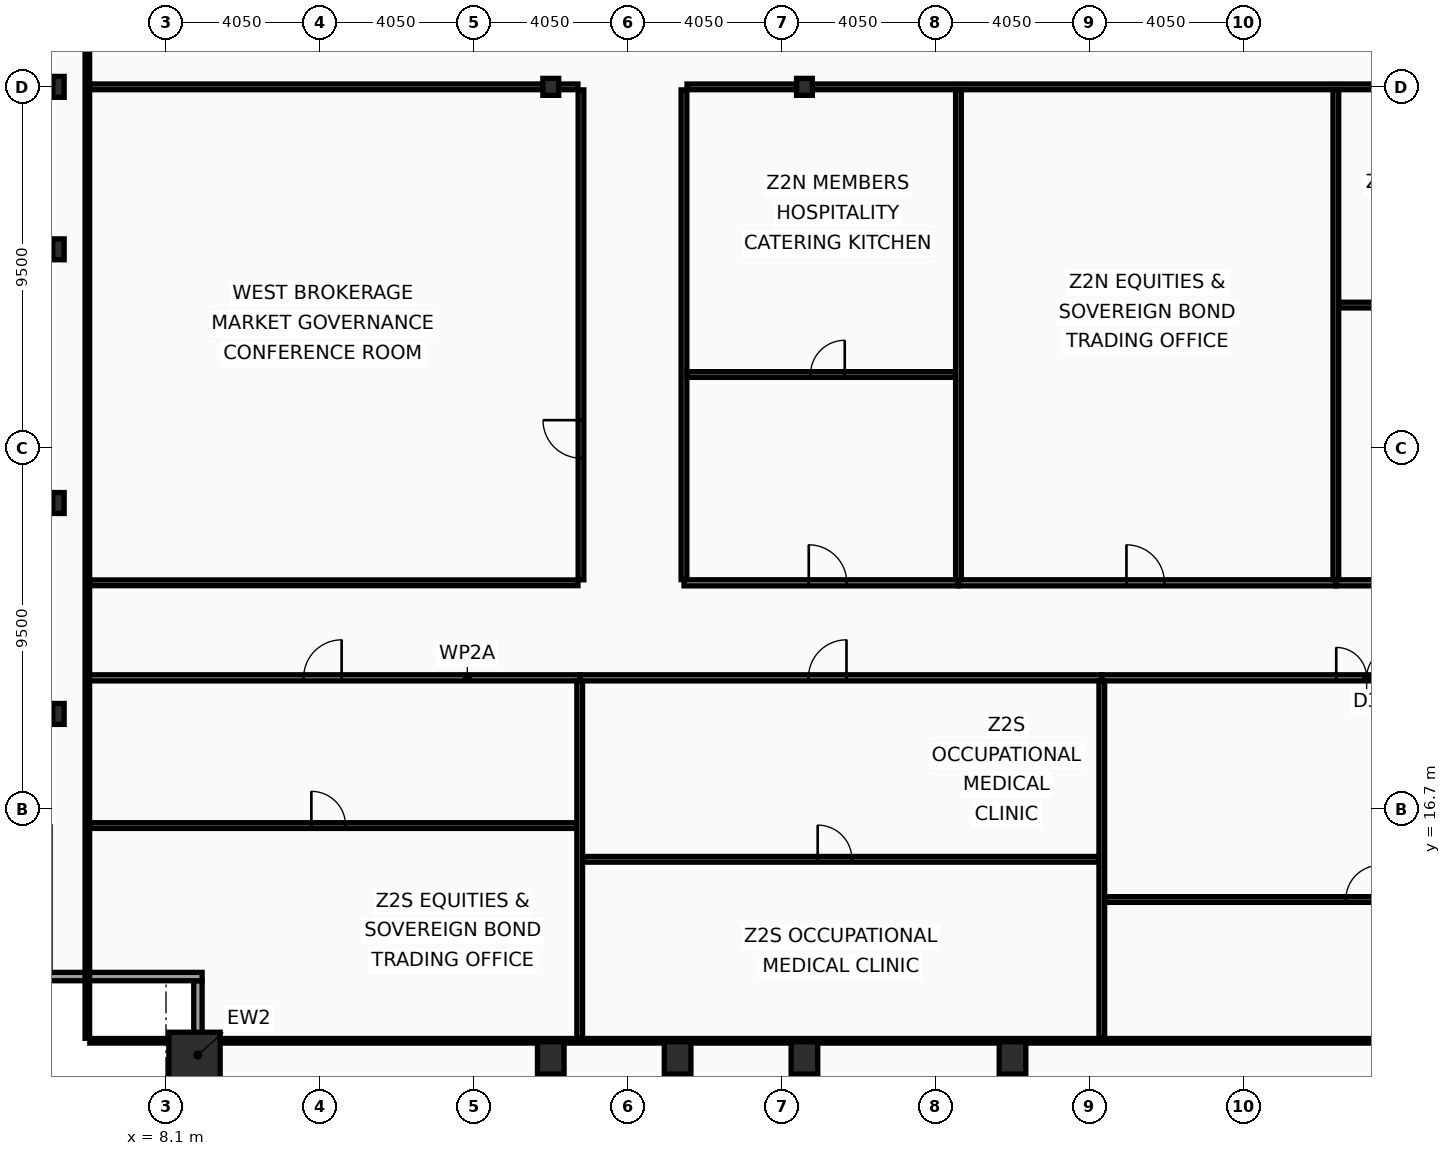
"""IFC4 building model, lengths in metres.
Left out: names, types, materials, properties, quantities, classifications, styles, units other than length and angle.
Written with IfcOpenShell. Run it as: python <this file> out.ifc"""

import sys

from ifc_helpers import new_model, si_unit, direction, frame, frame_2d, origin, origin_2d, place, context, subcontext, project, spatial, rectangle, hollow_rectangle, i_section, extrude, element, fill, save


model = new_model("IFC4")
c1 = context("Model", 3, precision=1e-05, world=origin(), true_north=direction((0.0, 1.0)))
c2 = subcontext(c1, "Body", "Model", "MODEL_VIEW")
j1 = project(units=[si_unit("LENGTHUNIT", "METRE"), si_unit("PLANEANGLEUNIT", "RADIAN")], contexts=[c1])
p1 = place(None, origin())
s1 = spatial("IfcSite", under=j1, at=p1, CompositionType="ELEMENT")
p2 = place(p1, origin())
s2 = spatial("IfcBuilding", under=s1, at=p2, CompositionType="ELEMENT")
p3 = place(p2, frame((0.0, 0.0, 157.8)))
s3 = spatial("IfcBuildingStorey", under=s2, at=p3, CompositionType="ELEMENT", Elevation=157.8)
p4 = place(p3, frame((8.85, 10.15, 0.0), z_axis=(0.0, 0.0, 1.0), x_axis=(1.0, 0.0, 0.0)))
e1 = element("IfcColumn", 1, at=p4, inside=s3, PredefinedType="COLUMN", context=c2, shape_type="SweptSolid", body=[
    extrude(hollow_rectangle(XDim=1.35, YDim=1.35, WallThickness=0.065, at=origin_2d()), origin(), (0.0, 0.0, 1.0), 3.6),
])
for number, where, z_axis, x_axis in (
    (2, (18.225, 10.15, 0.0), (0.0, 0.0, 1.0), (1.0, 0.0, 0.0)),
    (3, (21.562, 10.15, 0.0), (0.0, 0.0, 1.0), (1.0, 0.0, 0.0)),
    (4, (24.9, 10.15, 0.0), (0.0, 0.0, 1.0), (1.0, 0.0, 0.0)),
    (5, (30.375, 10.15, 0.0), (0.0, 0.0, 1.0), (1.0, 0.0, 0.0)),
):
    element("IfcColumn", number, at=place(p3, frame(where, z_axis=z_axis, x_axis=x_axis)), inside=s3, PredefinedType="COLUMN", context=c2, shape_type="SweptSolid", body=[
        extrude(hollow_rectangle(XDim=0.7, YDim=0.85, WallThickness=0.05, at=origin_2d()), origin(), (0.0, 0.0, 1.0), 3.6),
    ])
for number, where, z_axis, x_axis in (
    (6, (5.27, 19.2, 0.0), (0.0, 0.0, 1.0), (1.0, 0.0, 0.0)),
    (7, (5.27, 24.75, 0.0), (0.0, 0.0, 1.0), (1.0, 0.0, 0.0)),
    (8, (5.27, 31.425, 0.0), (0.0, 0.0, 1.0), (1.0, 0.0, 0.0)),
    (9, (5.27, 35.7, 0.0), (0.0, 0.0, 1.0), (1.0, 0.0, 0.0)),
):
    element("IfcColumn", number, at=place(p3, frame(where, z_axis=z_axis, x_axis=x_axis)), inside=s3, PredefinedType="COLUMN", context=c2, shape_type="SweptSolid", body=[
        extrude(i_section(OverallWidth=0.3, OverallDepth=0.55, WebThickness=0.015, FlangeThickness=0.029, at=origin_2d()), origin(), (0.0, 0.0, 1.0), 3.6),
    ])
for number, where, z_axis, x_axis in (
    (10, (18.225, 35.7, 0.0), (0.0, 0.0, 1.0), (1.0, 0.0, 0.0)),
    (11, (24.9, 35.7, 0.0), (0.0, 0.0, 1.0), (1.0, 0.0, 0.0)),
):
    element("IfcColumn", number, at=place(p3, frame(where, z_axis=z_axis, x_axis=x_axis)), inside=s3, PredefinedType="COLUMN", context=c2, shape_type="SweptSolid", body=[
        extrude(i_section(OverallWidth=0.416, OverallDepth=0.446, WebThickness=0.039, FlangeThickness=0.063, at=origin_2d()), origin(), (0.0, 0.0, 1.0), 3.6),
    ])
p5 = place(p3, frame((8.94, 8.27, 0.0), z_axis=(0.0, 0.0, 1.0), x_axis=(0.0, 1.0, 0.0)))
e12 = element("IfcWall", 12, at=p5, inside=s3, PredefinedType="SOLIDWALL", context=c2, shape_type="SweptSolid", body=[
    extrude(rectangle(XDim=3.91, YDim=0.22, at=frame_2d((1.955, 0.0))), origin(), (0.0, 0.0, 1.0), 2.83),
])
p6 = place(p3, frame((9.05, 12.29, 0.0), z_axis=(0.0, 0.0, 1.0), x_axis=(-1.0, 0.0, 0.0)))
e13 = element("IfcWall", 13, at=p6, inside=s3, PredefinedType="SOLIDWALL", context=c2, shape_type="SweptSolid", body=[
    extrude(rectangle(XDim=4.22, YDim=0.22, at=frame_2d((2.11, 0.0))), origin(), (0.0, 0.0, 1.0), 2.83),
])
p7 = place(p3, frame((6.03, 20.15, 0.0), z_axis=(0.0, 0.0, 1.0), x_axis=(1.0, 0.0, 0.0)))
e14 = element("IfcWall", 14, at=p7, inside=s3, PredefinedType="PARTITIONING", context=c2, shape_type="SweptSolid", body=[
    extrude(rectangle(XDim=12.956, YDim=0.16, at=frame_2d((6.478, 0.0))), origin(), (0.0, 0.0, 1.0), 2.73),
])
p8 = place(p7, frame((5.691, 0.0, 0.0)))
e15 = element("IfcOpeningElement", 15, at=p8, cuts=e14, PredefinedType="OPENING", context=c2, shape_type="SweptSolid", body=[
    extrude(rectangle(XDim=1.0, YDim=2.05, at=frame_2d((0.5, 1.025))), frame((0.0, 0.09, 0.0), z_axis=(0.0, -1.0, 0.0), x_axis=(1.0, 0.0, 0.0)), (0.0, 0.0, 1.0), 0.18),
])
p9 = place(p3, frame((6.095, 16.263, 0.0), z_axis=(0.0, 0.0, 1.0), x_axis=(1.0, 0.0, 0.0)))
e16 = element("IfcWall", 16, at=p9, inside=s3, PredefinedType="PARTITIONING", context=c2, shape_type="SweptSolid", body=[
    extrude(rectangle(XDim=12.811, YDim=0.15, at=frame_2d((6.406, 0.0))), origin(), (0.0, 0.0, 1.0), 2.73),
])
p10 = place(p9, frame((5.83, 0.0, 0.0)))
e17 = element("IfcOpeningElement", 17, at=p10, cuts=e16, PredefinedType="OPENING", context=c2, shape_type="SweptSolid", body=[
    extrude(rectangle(XDim=0.9, YDim=2.05, at=frame_2d((0.45, 1.025))), frame((0.0, 0.085, 0.0), z_axis=(0.0, -1.0, 0.0), x_axis=(1.0, 0.0, 0.0)), (0.0, 0.0, 1.0), 0.17),
])
p11 = place(p3, frame((18.986, 20.15, 0.0), z_axis=(0.0, 0.0, 1.0), x_axis=(1.0, 0.0, 0.0)))
e18 = element("IfcWall", 18, at=p11, inside=s3, PredefinedType="PARTITIONING", context=c2, shape_type="SweptSolid", body=[
    extrude(rectangle(XDim=13.739, YDim=0.16, at=frame_2d((6.869, 0.0))), origin(), (0.0, 0.0, 1.0), 2.73),
])
p12 = place(p11, frame((6.02, 0.0, 0.0)))
e19 = element("IfcOpeningElement", 19, at=p12, cuts=e18, PredefinedType="OPENING", context=c2, shape_type="SweptSolid", body=[
    extrude(rectangle(XDim=1.0, YDim=2.05, at=frame_2d((0.5, 1.025))), frame((0.0, 0.09, 0.0), z_axis=(0.0, -1.0, 0.0), x_axis=(1.0, 0.0, 0.0)), (0.0, 0.0, 1.0), 0.18),
])
p13 = place(p3, frame((18.986, 10.665, 0.0), z_axis=(0.0, 0.0, 1.0), x_axis=(0.0, 1.0, 0.0)))
e20 = element("IfcWall", 20, at=p13, inside=s3, PredefinedType="PARTITIONING", context=c2, shape_type="SweptSolid", body=[
    extrude(rectangle(XDim=9.4, YDim=0.15, at=frame_2d((4.7, 0.0))), origin(), (0.0, 0.0, 1.0), 2.93),
])
p14 = place(p3, frame((19.066, 15.375, 0.0), z_axis=(0.0, 0.0, 1.0), x_axis=(1.0, 0.0, 0.0)))
e21 = element("IfcWall", 21, at=p14, inside=s3, PredefinedType="PARTITIONING", context=c2, shape_type="SweptSolid", body=[
    extrude(rectangle(XDim=13.579, YDim=0.15, at=frame_2d((6.79, 0.0))), origin(), (0.0, 0.0, 1.0), 2.73),
])
p15 = place(p14, frame((6.183, 0.0, 0.0)))
e22 = element("IfcOpeningElement", 22, at=p15, cuts=e21, PredefinedType="OPENING", context=c2, shape_type="SweptSolid", body=[
    extrude(rectangle(XDim=0.9, YDim=2.05, at=frame_2d((0.45, 1.025))), frame((0.0, 0.085, 0.0), z_axis=(0.0, -1.0, 0.0), x_axis=(1.0, 0.0, 0.0)), (0.0, 0.0, 1.0), 0.17),
])
p16 = place(p3, frame((32.725, 20.15, 0.0), z_axis=(0.0, 0.0, 1.0), x_axis=(1.0, 0.0, 0.0)))
e23 = element("IfcWall", 23, at=p16, inside=s3, PredefinedType="PARTITIONING", context=c2, shape_type="SweptSolid", body=[
    extrude(rectangle(XDim=14.093, YDim=0.16, at=frame_2d((7.046, 0.0))), origin(), (0.0, 0.0, 1.0), 2.73),
])
p17 = place(p16, frame((6.169, 0.0, 0.0)))
e24 = element("IfcOpeningElement", 24, at=p17, cuts=e23, PredefinedType="OPENING", context=c2, shape_type="SweptSolid", body=[
    extrude(rectangle(XDim=1.6, YDim=2.15, at=frame_2d((0.8, 1.075))), frame((0.0, 0.09, 0.0), z_axis=(0.0, -1.0, 0.0), x_axis=(1.0, 0.0, 0.0)), (0.0, 0.0, 1.0), 0.18),
])
p18 = place(p3, frame((32.725, 10.665, 0.0), z_axis=(0.0, 0.0, 1.0), x_axis=(0.0, 1.0, 0.0)))
e25 = element("IfcWall", 25, at=p18, inside=s3, PredefinedType="PARTITIONING", context=c2, shape_type="SweptSolid", body=[
    extrude(rectangle(XDim=9.4, YDim=0.15, at=frame_2d((4.7, 0.0))), origin(), (0.0, 0.0, 1.0), 2.93),
])
p19 = place(p3, frame((32.805, 14.317, 0.0), z_axis=(0.0, 0.0, 1.0), x_axis=(1.0, 0.0, 0.0)))
e26 = element("IfcWall", 26, at=p19, inside=s3, PredefinedType="PARTITIONING", context=c2, shape_type="SweptSolid", body=[
    extrude(rectangle(XDim=13.933, YDim=0.15, at=frame_2d((6.966, 0.0))), origin(), (0.0, 0.0, 1.0), 2.73),
])
p20 = place(p19, frame((6.342, 0.0, 0.0)))
e27 = element("IfcOpeningElement", 27, at=p20, cuts=e26, PredefinedType="OPENING", context=c2, shape_type="SweptSolid", body=[
    extrude(rectangle(XDim=0.9, YDim=2.05, at=frame_2d((0.45, 1.025))), frame((0.0, 0.085, 0.0), z_axis=(0.0, -1.0, 0.0), x_axis=(1.0, 0.0, 0.0)), (0.0, 0.0, 1.0), 0.17),
])
p21 = place(p3, frame((19.02, 22.73, 0.0), z_axis=(0.0, 0.0, 1.0), x_axis=(0.0, 1.0, 0.0)))
e28 = element("IfcWall", 28, at=p21, inside=s3, PredefinedType="PARTITIONING", context=c2, shape_type="SweptSolid", body=[
    extrude(rectangle(XDim=12.89, YDim=0.15, at=frame_2d((6.445, 0.0))), origin(), (0.0, 0.0, 1.0), 2.93),
])
p22 = place(p21, frame((3.2, 0.0, 0.0)))
e29 = element("IfcOpeningElement", 29, at=p22, cuts=e28, PredefinedType="OPENING", context=c2, shape_type="SweptSolid", body=[
    extrude(rectangle(XDim=1.0, YDim=2.05, at=frame_2d((0.5, 1.025))), frame((0.0, 0.085, 0.0), z_axis=(0.0, -1.0, 0.0), x_axis=(1.0, 0.0, 0.0)), (0.0, 0.0, 1.0), 0.17),
])
for number, where, z_axis, x_axis in (
    (30, (6.095, 22.65, 0.0), (0.0, 0.0, 1.0), (1.0, 0.0, 0.0)),
    (31, (6.095, 35.7, 0.0), (0.0, 0.0, 1.0), (1.0, 0.0, 0.0)),
):
    element("IfcWall", number, at=place(p3, frame(where, z_axis=z_axis, x_axis=x_axis)), inside=s3, PredefinedType="PARTITIONING", context=c2, shape_type="SweptSolid", body=[
        extrude(rectangle(XDim=12.845, YDim=0.15, at=frame_2d((6.422, 0.0))), origin(), (0.0, 0.0, 1.0), 2.73),
    ])
p23 = place(p3, frame((21.73, 22.735, 0.0), z_axis=(0.0, 0.0, 1.0), x_axis=(0.0, 1.0, 0.0)))
e32 = element("IfcWall", 32, at=p23, inside=s3, PredefinedType="PARTITIONING", context=c2, shape_type="SweptSolid", body=[
    extrude(rectangle(XDim=12.885, YDim=0.15, at=frame_2d((6.442, 0.0))), origin(), (0.0, 0.0, 1.0), 2.93),
])
p24 = place(p3, frame((21.81, 35.7, 0.0), z_axis=(0.0, 0.0, 1.0), x_axis=(1.0, 0.0, 0.0)))
e33 = element("IfcWall", 33, at=p24, inside=s3, PredefinedType="PARTITIONING", context=c2, shape_type="SweptSolid", body=[
    extrude(rectangle(XDim=44.995, YDim=0.15, at=frame_2d((22.498, 0.0))), origin(), (0.0, 0.0, 1.0), 2.73),
])
p25 = place(p3, frame((21.73, 22.65, 0.0), z_axis=(0.0, 0.0, 1.0), x_axis=(1.0, 0.0, 0.0)))
e34 = element("IfcWall", 34, at=p25, inside=s3, PredefinedType="PARTITIONING", context=c2, shape_type="SweptSolid", body=[
    extrude(rectangle(XDim=7.222, YDim=0.16, at=frame_2d((3.611, 0.0))), origin(), (0.0, 0.0, 1.0), 2.73),
])
p26 = place(p25, frame((3.283, 0.0, 0.0)))
e35 = element("IfcOpeningElement", 35, at=p26, cuts=e34, PredefinedType="OPENING", context=c2, shape_type="SweptSolid", body=[
    extrude(rectangle(XDim=1.0, YDim=2.05, at=frame_2d((0.5, 1.025))), frame((0.0, 0.09, 0.0), z_axis=(0.0, -1.0, 0.0), x_axis=(1.0, 0.0, 0.0)), (0.0, 0.0, 1.0), 0.18),
])
p27 = place(p3, frame((21.81, 28.131, 0.0), z_axis=(0.0, 0.0, 1.0), x_axis=(1.0, 0.0, 0.0)))
e36 = element("IfcWall", 36, at=p27, inside=s3, PredefinedType="PARTITIONING", context=c2, shape_type="SweptSolid", body=[
    extrude(rectangle(XDim=7.062, YDim=0.15, at=frame_2d((3.531, 0.0))), origin(), (0.0, 0.0, 1.0), 2.73),
])
p28 = place(p27, frame((3.25, 0.0, 0.0)))
e37 = element("IfcOpeningElement", 37, at=p28, cuts=e36, PredefinedType="OPENING", context=c2, shape_type="SweptSolid", body=[
    extrude(rectangle(XDim=0.9, YDim=2.05, at=frame_2d((0.45, 1.025))), frame((0.0, 0.085, 0.0), z_axis=(0.0, -1.0, 0.0), x_axis=(1.0, 0.0, 0.0)), (0.0, 0.0, 1.0), 0.17),
])
p29 = place(p3, frame((28.952, 22.65, 0.0), z_axis=(0.0, 0.0, 1.0), x_axis=(1.0, 0.0, 0.0)))
e38 = element("IfcWall", 38, at=p29, inside=s3, PredefinedType="PARTITIONING", context=c2, shape_type="SweptSolid", body=[
    extrude(rectangle(XDim=9.931, YDim=0.16, at=frame_2d((4.965, 0.0))), origin(), (0.0, 0.0, 1.0), 2.73),
])
p30 = place(p29, frame((4.421, 0.0, 0.0)))
e39 = element("IfcOpeningElement", 39, at=p30, cuts=e38, PredefinedType="OPENING", context=c2, shape_type="SweptSolid", body=[
    extrude(rectangle(XDim=1.0, YDim=2.05, at=frame_2d((0.5, 1.025))), frame((0.0, 0.09, 0.0), z_axis=(0.0, -1.0, 0.0), x_axis=(1.0, 0.0, 0.0)), (0.0, 0.0, 1.0), 0.18),
])
p31 = place(p3, frame((28.952, 22.735, 0.0), z_axis=(0.0, 0.0, 1.0), x_axis=(0.0, 1.0, 0.0)))
e40 = element("IfcWall", 40, at=p31, inside=s3, PredefinedType="PARTITIONING", context=c2, shape_type="SweptSolid", body=[
    extrude(rectangle(XDim=12.885, YDim=0.15, at=frame_2d((6.442, 0.0))), origin(), (0.0, 0.0, 1.0), 2.93),
])
p32 = place(p3, frame((38.883, 22.65, 0.0), z_axis=(0.0, 0.0, 1.0), x_axis=(1.0, 0.0, 0.0)))
e41 = element("IfcWall", 41, at=p32, inside=s3, PredefinedType="PARTITIONING", context=c2, shape_type="SweptSolid", body=[
    extrude(rectangle(XDim=12.639, YDim=0.16, at=frame_2d((6.32, 0.0))), origin(), (0.0, 0.0, 1.0), 2.73),
])
p33 = place(p32, frame((5.559, 0.0, 0.0)))
e42 = element("IfcOpeningElement", 42, at=p33, cuts=e41, PredefinedType="OPENING", context=c2, shape_type="SweptSolid", body=[
    extrude(rectangle(XDim=1.0, YDim=2.05, at=frame_2d((0.5, 1.025))), frame((0.0, 0.09, 0.0), z_axis=(0.0, -1.0, 0.0), x_axis=(1.0, 0.0, 0.0)), (0.0, 0.0, 1.0), 0.18),
])
p34 = place(p3, frame((38.883, 22.735, 0.0), z_axis=(0.0, 0.0, 1.0), x_axis=(0.0, 1.0, 0.0)))
e43 = element("IfcWall", 43, at=p34, inside=s3, PredefinedType="PARTITIONING", context=c2, shape_type="SweptSolid", body=[
    extrude(rectangle(XDim=12.885, YDim=0.15, at=frame_2d((6.442, 0.0))), origin(), (0.0, 0.0, 1.0), 2.93),
])
p35 = place(p3, frame((38.963, 29.958, 0.0), z_axis=(0.0, 0.0, 1.0), x_axis=(1.0, 0.0, 0.0)))
e44 = element("IfcWall", 44, at=p35, inside=s3, PredefinedType="PARTITIONING", context=c2, shape_type="SweptSolid", body=[
    extrude(rectangle(XDim=12.479, YDim=0.15, at=frame_2d((6.24, 0.0))), origin(), (0.0, 0.0, 1.0), 2.73),
])
p36 = place(p35, frame((5.688, 0.0, 0.0)))
e45 = element("IfcOpeningElement", 45, at=p36, cuts=e44, PredefinedType="OPENING", context=c2, shape_type="SweptSolid", body=[
    extrude(rectangle(XDim=0.9, YDim=2.05, at=frame_2d((0.45, 1.025))), frame((0.0, 0.085, 0.0), z_axis=(0.0, -1.0, 0.0), x_axis=(1.0, 0.0, 0.0)), (0.0, 0.0, 1.0), 0.17),
])
p37 = place(p3, frame((6.03, 10.665, 0.0), z_axis=(0.0, 0.0, 1.0), x_axis=(0.0, 1.0, 0.0)))
e46 = element("IfcWall", 46, at=p37, inside=s3, PredefinedType="PARTITIONING", context=c2, shape_type="SweptSolid", body=[
    extrude(rectangle(XDim=42.11, YDim=0.12, at=frame_2d((21.055, 0.0))), origin(), (0.0, 0.0, 1.0), 2.73),
])
p38 = place(p3, frame((6.095, 10.6, 0.0), z_axis=(0.0, 0.0, 1.0), x_axis=(1.0, 0.0, 0.0)))
e47 = element("IfcWall", 47, at=p38, inside=s3, PredefinedType="PARTITIONING", context=c2, shape_type="SweptSolid", body=[
    extrude(rectangle(XDim=60.71, YDim=0.12, at=frame_2d((30.355, 0.0))), origin(), (0.0, 0.0, 1.0), 2.73),
])
p39 = place(p8, origin())
e48 = element("IfcDoor", 48, at=p39, inside=s3, OperationType="SINGLE_SWING_RIGHT", PredefinedType="DOOR", context=c2, shape_type="SweptSolid", body=[
    extrude(rectangle(XDim=1.0, YDim=2.05, at=frame_2d((0.5, 1.025))), frame((0.0, 0.025, 0.0), z_axis=(0.0, -1.0, 0.0), x_axis=(1.0, 0.0, 0.0)), (0.0, 0.0, 1.0), 0.05),
])
fill(e15, e48)
p40 = place(p10, origin())
e49 = element("IfcDoor", 49, at=p40, inside=s3, OperationType="SINGLE_SWING_LEFT", PredefinedType="DOOR", context=c2, shape_type="SweptSolid", body=[
    extrude(rectangle(XDim=0.9, YDim=2.05, at=frame_2d((0.45, 1.025))), frame((0.0, 0.025, 0.0), z_axis=(0.0, -1.0, 0.0), x_axis=(1.0, 0.0, 0.0)), (0.0, 0.0, 1.0), 0.05),
])
fill(e17, e49)
p41 = place(p12, origin())
e50 = element("IfcDoor", 50, at=p41, inside=s3, OperationType="SINGLE_SWING_RIGHT", PredefinedType="DOOR", context=c2, shape_type="SweptSolid", body=[
    extrude(rectangle(XDim=1.0, YDim=2.05, at=frame_2d((0.5, 1.025))), frame((0.0, 0.025, 0.0), z_axis=(0.0, -1.0, 0.0), x_axis=(1.0, 0.0, 0.0)), (0.0, 0.0, 1.0), 0.05),
])
fill(e19, e50)
p42 = place(p15, origin())
e51 = element("IfcDoor", 51, at=p42, inside=s3, OperationType="SINGLE_SWING_LEFT", PredefinedType="DOOR", context=c2, shape_type="SweptSolid", body=[
    extrude(rectangle(XDim=0.9, YDim=2.05, at=frame_2d((0.45, 1.025))), frame((0.0, 0.025, 0.0), z_axis=(0.0, -1.0, 0.0), x_axis=(1.0, 0.0, 0.0)), (0.0, 0.0, 1.0), 0.05),
])
fill(e22, e51)
p43 = place(p17, origin())
e52 = element("IfcDoor", 52, at=p43, inside=s3, OperationType="DOUBLE_DOOR_SINGLE_SWING", PredefinedType="DOOR", context=c2, shape_type="SweptSolid", body=[
    extrude(rectangle(XDim=1.6, YDim=2.15, at=frame_2d((0.8, 1.075))), frame((0.0, 0.025, 0.0), z_axis=(0.0, -1.0, 0.0), x_axis=(1.0, 0.0, 0.0)), (0.0, 0.0, 1.0), 0.05),
])
fill(e24, e52)
p44 = place(p20, origin())
e53 = element("IfcDoor", 53, at=p44, inside=s3, OperationType="SINGLE_SWING_RIGHT", PredefinedType="DOOR", context=c2, shape_type="SweptSolid", body=[
    extrude(rectangle(XDim=0.9, YDim=2.05, at=frame_2d((0.45, 1.025))), frame((0.0, 0.025, 0.0), z_axis=(0.0, -1.0, 0.0), x_axis=(1.0, 0.0, 0.0)), (0.0, 0.0, 1.0), 0.05),
])
fill(e27, e53)
p45 = place(p22, origin())
e54 = element("IfcDoor", 54, at=p45, inside=s3, OperationType="SINGLE_SWING_RIGHT", PredefinedType="DOOR", context=c2, shape_type="SweptSolid", body=[
    extrude(rectangle(XDim=1.0, YDim=2.05, at=frame_2d((0.5, 1.025))), frame((0.0, 0.025, 0.0), z_axis=(0.0, -1.0, 0.0), x_axis=(1.0, 0.0, 0.0)), (0.0, 0.0, 1.0), 0.05),
])
fill(e29, e54)
p46 = place(p26, origin())
e55 = element("IfcDoor", 55, at=p46, inside=s3, OperationType="SINGLE_SWING_LEFT", PredefinedType="DOOR", context=c2, shape_type="SweptSolid", body=[
    extrude(rectangle(XDim=1.0, YDim=2.05, at=frame_2d((0.5, 1.025))), frame((0.0, 0.025, 0.0), z_axis=(0.0, -1.0, 0.0), x_axis=(1.0, 0.0, 0.0)), (0.0, 0.0, 1.0), 0.05),
])
fill(e35, e55)
p47 = place(p28, origin())
e56 = element("IfcDoor", 56, at=p47, inside=s3, OperationType="SINGLE_SWING_RIGHT", PredefinedType="DOOR", context=c2, shape_type="SweptSolid", body=[
    extrude(rectangle(XDim=0.9, YDim=2.05, at=frame_2d((0.45, 1.025))), frame((0.0, 0.025, 0.0), z_axis=(0.0, -1.0, 0.0), x_axis=(1.0, 0.0, 0.0)), (0.0, 0.0, 1.0), 0.05),
])
fill(e37, e56)
p48 = place(p30, origin())
e57 = element("IfcDoor", 57, at=p48, inside=s3, OperationType="SINGLE_SWING_LEFT", PredefinedType="DOOR", context=c2, shape_type="SweptSolid", body=[
    extrude(rectangle(XDim=1.0, YDim=2.05, at=frame_2d((0.5, 1.025))), frame((0.0, 0.025, 0.0), z_axis=(0.0, -1.0, 0.0), x_axis=(1.0, 0.0, 0.0)), (0.0, 0.0, 1.0), 0.05),
])
fill(e39, e57)
save(model, sys.argv[1])
